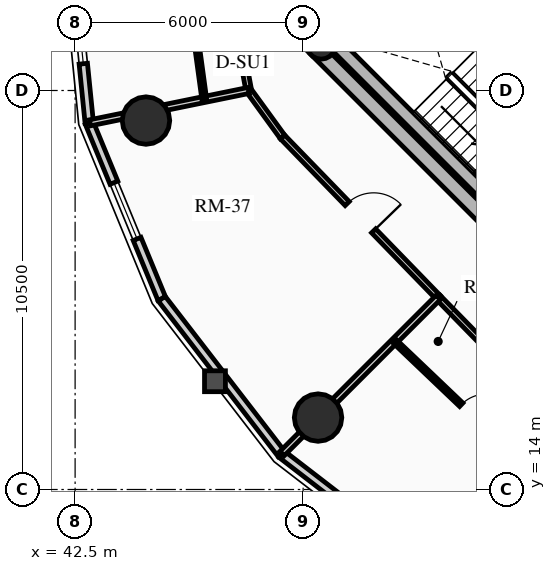
"""IFC4 building model, lengths in metres.
Left out: names, types, materials, properties, quantities, classifications, styles, units other than length and angle.
Written with IfcOpenShell. Run it as: python <this file> out.ifc"""

import sys

from ifc_helpers import new_model, si_unit, direction, frame, frame_2d, origin, origin_2d, place, context, subcontext, project, spatial, rectangle, circle, hollow_circle, extrude, source, transform, mapped, element, fill, save


model = new_model("IFC4")
c1 = context("Model", 3, precision=1e-05, world=origin(), true_north=direction((0.0, 1.0)))
c2 = subcontext(c1, "Body", "Model", "MODEL_VIEW")
j1 = project(units=[si_unit("LENGTHUNIT", "METRE"), si_unit("PLANEANGLEUNIT", "RADIAN")], contexts=[c1])
p1 = place(None, origin())
s1 = spatial("IfcSite", under=j1, at=p1, CompositionType="ELEMENT")
p2 = place(p1, origin())
s2 = spatial("IfcBuilding", under=s1, at=p2, CompositionType="ELEMENT")
p3 = place(p2, frame((0.0, 0.0, 171.97)))
s3 = spatial("IfcBuildingStorey", under=s2, at=p3, CompositionType="ELEMENT", Elevation=171.97)
p4 = place(p3, frame((58.702, 15.732, 0.0), z_axis=(0.0, 0.0, 1.0), x_axis=(-0.707106781187, 0.707106781187, 0.0)))
e1 = element("IfcWall", 1, at=p4, inside=s3, PredefinedType="SHEAR", context=c2, shape_type="SweptSolid", body=[
    extrude(rectangle(XDim=14.1, YDim=0.4, at=frame_2d((7.05, 0.0))), origin(), (0.0, 0.0, 1.0), 2.91),
])
p5 = place(p3, frame((48.873, 25.561, 0.0), z_axis=(0.0, 0.0, 1.0), x_axis=(0.707106781187, 0.707106781187, 0.0)))
e2 = element("IfcWall", 2, at=p5, inside=s3, PredefinedType="SHEAR", context=c2, shape_type="SweptSolid", body=[
    extrude(rectangle(XDim=10.7, YDim=0.4, at=frame_2d((5.35, 0.0))), origin(), (0.0, 0.0, 1.0), 2.91),
])
m1 = source(origin(), c2, "Body", "SweptSolid", [
    extrude(rectangle(XDim=1.5, YDim=2.02, at=frame_2d((0.75, 1.01))), frame((0.0, 0.21, 0.0), z_axis=(0.0, -1.0, 0.0), x_axis=(1.0, 0.0, 0.0)), (0.0, 0.0, 1.0), 0.42),
])
p6 = place(p5, frame((4.6, 0.0, 0.0)))
e3 = element("IfcOpeningElement", 3, at=p6, cuts=e2, PredefinedType="OPENING", context=c2, shape_type="MappedRepresentation", body=[
    mapped(m1, transform((0.0, 0.0, 0.0), x_axis=(1.0, 0.0, 0.0), y_axis=(0.0, 1.0, 0.0), z_axis=(0.0, 0.0, 1.0), scale=1.0)),
])
p7 = place(p3, frame((61.06, 18.373, 0.0), z_axis=(0.0, 0.0, 1.0), x_axis=(-0.707106781187, 0.707106781187, 0.0)))
e4 = element("IfcWall", 4, at=p7, inside=s3, PredefinedType="SHEAR", context=c2, shape_type="SweptSolid", body=[
    extrude(rectangle(XDim=13.7, YDim=0.35, at=frame_2d((6.85, 0.0))), origin(), (0.0, 0.0, 1.0), 2.91),
])
m2 = source(origin(), c2, "Body", "SweptSolid", [
    extrude(rectangle(XDim=1.1, YDim=2.015, at=frame_2d((0.55, 1.007))), frame((0.0, 0.185, 0.0), z_axis=(0.0, -1.0, 0.0), x_axis=(1.0, 0.0, 0.0)), (0.0, 0.0, 1.0), 0.37),
])
p8 = place(p7, frame((4.85, 0.0, 0.0)))
e5 = element("IfcOpeningElement", 5, at=p8, cuts=e4, PredefinedType="OPENING", context=c2, shape_type="MappedRepresentation", body=[
    mapped(m2, transform((0.0, 0.0, 0.0), x_axis=(1.0, 0.0, 0.0), y_axis=(0.0, 1.0, 0.0), z_axis=(0.0, 0.0, 1.0), scale=1.0)),
])
p9 = place(p7, frame((0.625, 0.0, 0.0)))
e6 = element("IfcOpeningElement", 6, at=p9, cuts=e4, PredefinedType="OPENING", context=c2, shape_type="MappedRepresentation", body=[
    mapped(m2, transform((0.0, 0.0, 0.0), x_axis=(1.0, 0.0, 0.0), y_axis=(0.0, 1.0, 0.0), z_axis=(0.0, 0.0, 1.0), scale=1.0)),
])
p10 = place(p7, frame((2.625, 0.0, 0.0)))
e7 = element("IfcOpeningElement", 7, at=p10, cuts=e4, PredefinedType="OPENING", context=c2, shape_type="MappedRepresentation", body=[
    mapped(m2, transform((0.0, 0.0, 0.0), x_axis=(1.0, 0.0, 0.0), y_axis=(0.0, 1.0, 0.0), z_axis=(0.0, 0.0, 1.0), scale=1.0)),
])
m3 = source(origin(), c2, "Body", "SweptSolid", [
    extrude(rectangle(XDim=1.15, YDim=2.02, at=frame_2d((0.575, 1.01))), frame((0.0, 0.185, 0.0), z_axis=(0.0, -1.0, 0.0), x_axis=(1.0, 0.0, 0.0)), (0.0, 0.0, 1.0), 0.37),
])
p11 = place(p7, frame((7.27, 0.0, 0.0)))
e8 = element("IfcOpeningElement", 8, at=p11, cuts=e4, PredefinedType="OPENING", context=c2, shape_type="MappedRepresentation", body=[
    mapped(m3, transform((0.0, 0.0, 0.0), x_axis=(1.0, 0.0, 0.0), y_axis=(0.0, 1.0, 0.0), z_axis=(0.0, 0.0, 1.0), scale=1.0)),
])
p12 = place(p3, frame((53.922, 21.141, 0.0), z_axis=(0.0, 0.0, 1.0), x_axis=(-0.707106781187, 0.707106781187, 0.0)))
e9 = element("IfcWall", 9, at=p12, inside=s3, PredefinedType="SHEAR", context=c2, shape_type="SweptSolid", body=[
    extrude(rectangle(XDim=6.695, YDim=0.35, at=frame_2d((3.348, 0.0))), origin(), (0.0, 0.0, 1.0), 2.91),
])
p13 = place(p3, frame((48.976, 25.706, 0.0), z_axis=(0.0, 0.0, 1.0), x_axis=(0.707106781187, 0.707106781187, 0.0)))
e10 = element("IfcColumn", 10, at=p13, inside=s3, PredefinedType="COLUMN", context=c2, shape_type="SweptSolid", body=[
    extrude(hollow_circle(Radius=0.38, WallThickness=0.032, at=origin_2d()), origin(), (0.0, 0.0, 1.0), 2.91),
])
for number, where, z_axis, x_axis in (
    (11, (44.365, 23.709, 0.0), (0.0, 0.0, 1.0), (1.0, 0.0, 0.0)),
    (12, (48.893, 15.893, 0.0), (0.0, 0.0, 1.0), (1.0, 0.0, 0.0)),
):
    element("IfcColumn", number, at=place(p3, frame(where, z_axis=z_axis, x_axis=x_axis)), inside=s3, PredefinedType="USERDEFINED", context=c2, shape_type="SweptSolid", body=[
        extrude(circle(Radius=0.625, at=origin_2d()), origin(), (0.0, 0.0, 1.0), 2.91),
    ])
p14 = place(p3, frame((42.873, 23.646, 0.0), z_axis=(0.0, 0.0, 1.0), x_axis=(-0.100438356004, 0.994943283129, 0.0)))
e13 = element("IfcWall", 13, at=p14, inside=s3, PredefinedType="SOLIDWALL", context=c2, shape_type="SweptSolid", body=[
    extrude(rectangle(XDim=4.733, YDim=0.22, at=frame_2d((2.366, 0.0))), origin(), (0.0, 0.0, 1.0), 2.245),
])
m4 = source(origin(), c2, "Body", "SweptSolid", [
    extrude(rectangle(XDim=1.6, YDim=1.3, at=frame_2d((0.8, 0.65))), frame((0.0, 0.12, 0.0), z_axis=(0.0, -1.0, 0.0), x_axis=(1.0, 0.0, 0.0)), (0.0, 0.0, 1.0), 0.24),
])
p15 = place(p14, frame((1.566, 0.0, 0.65)))
e14 = element("IfcOpeningElement", 14, at=p15, cuts=e13, PredefinedType="OPENING", context=c2, shape_type="MappedRepresentation", body=[
    mapped(m4, transform((0.0, 0.0, 0.0), x_axis=(1.0, 0.0, 0.0), y_axis=(0.0, 1.0, 0.0), z_axis=(0.0, 0.0, 1.0), scale=1.0)),
])
p16 = place(p3, frame((44.78, 19.021, 0.0), z_axis=(0.0, 0.0, 1.0), x_axis=(-0.381196434348, 0.924494066201, 0.0)))
e15 = element("IfcWall", 15, at=p16, inside=s3, PredefinedType="SOLIDWALL", context=c2, shape_type="SweptSolid", body=[
    extrude(rectangle(XDim=5.003, YDim=0.22, at=frame_2d((2.501, 0.0))), origin(), (0.0, 0.0, 1.0), 2.245),
])
p17 = place(p16, frame((1.702, 0.0, 0.65)))
e16 = element("IfcOpeningElement", 16, at=p17, cuts=e15, PredefinedType="OPENING", context=c2, shape_type="MappedRepresentation", body=[
    mapped(m4, transform((0.0, 0.0, 0.0), x_axis=(1.0, 0.0, 0.0), y_axis=(0.0, 1.0, 0.0), z_axis=(0.0, 0.0, 1.0), scale=1.0)),
])
p18 = place(p3, frame((47.932, 14.932, 0.0), z_axis=(0.0, 0.0, 1.0), x_axis=(-0.610569654715, 0.791962560189, 0.0)))
e17 = element("IfcWall", 17, at=p18, inside=s3, PredefinedType="SOLIDWALL", context=c2, shape_type="SweptSolid", body=[
    extrude(rectangle(XDim=5.163, YDim=0.22, at=frame_2d((2.582, 0.0))), origin(), (0.0, 0.0, 1.0), 2.245),
])
p19 = place(p3, frame((52.021, 11.78, 0.0), z_axis=(0.0, 0.0, 1.0), x_axis=(-0.791962560189, 0.610569654715, 0.0)))
e18 = element("IfcWall", 18, at=p19, inside=s3, PredefinedType="SOLIDWALL", context=c2, shape_type="SweptSolid", body=[
    extrude(rectangle(XDim=5.163, YDim=0.22, at=frame_2d((2.582, 0.0))), origin(), (0.0, 0.0, 1.0), 2.245),
])
p20 = place(p19, frame((1.782, 0.0, 0.65)))
e19 = element("IfcOpeningElement", 19, at=p20, cuts=e18, PredefinedType="OPENING", context=c2, shape_type="MappedRepresentation", body=[
    mapped(m4, transform((0.0, 0.0, 0.0), x_axis=(1.0, 0.0, 0.0), y_axis=(0.0, 1.0, 0.0), z_axis=(0.0, 0.0, 1.0), scale=1.0)),
])
p21 = place(p3, frame((46.822, 25.836, 0.0), z_axis=(0.0, 0.0, 1.0), x_axis=(0.182115036249, -0.983277231289, 0.0)))
e20 = element("IfcWall", 20, at=p21, inside=s3, PredefinedType="PARTITIONING", context=c2, shape_type="SweptSolid", body=[
    extrude(rectangle(XDim=1.357, YDim=0.15, at=frame_2d((0.678, 0.0))), origin(), (0.0, 0.0, 1.0), 2.245),
])
p22 = place(p3, frame((47.069, 24.502, 0.0), z_axis=(0.0, 0.0, 1.0), x_axis=(0.587577436866, -0.809167940347, 0.0)))
e21 = element("IfcWall", 21, at=p22, inside=s3, PredefinedType="PARTITIONING", context=c2, shape_type="SweptSolid", body=[
    extrude(rectangle(XDim=1.515, YDim=0.15, at=frame_2d((0.757, 0.0))), origin(), (0.0, 0.0, 1.0), 2.245),
])
p23 = place(p3, frame((47.959, 23.277, 0.0), z_axis=(0.0, 0.0, 1.0), x_axis=(0.696422573496, -0.717631938479, 0.0)))
e22 = element("IfcWall", 22, at=p23, inside=s3, PredefinedType="PARTITIONING", context=c2, shape_type="SweptSolid", body=[
    extrude(rectangle(XDim=5.882, YDim=0.15, at=frame_2d((2.941, 0.0))), origin(), (0.0, 0.0, 1.0), 2.675),
])
m5 = source(origin(), c2, "Body", "SweptSolid", [
    extrude(rectangle(XDim=1.0, YDim=2.015, at=frame_2d((0.5, 1.007))), frame((0.0, 0.085, 0.0), z_axis=(0.0, -1.0, 0.0), x_axis=(1.0, 0.0, 0.0)), (0.0, 0.0, 1.0), 0.17),
])
p24 = place(p23, frame((2.441, 0.0, 0.0)))
e23 = element("IfcOpeningElement", 23, at=p24, cuts=e22, PredefinedType="OPENING", context=c2, shape_type="MappedRepresentation", body=[
    mapped(m5, transform((0.0, 0.0, 0.0), x_axis=(1.0, 0.0, 0.0), y_axis=(0.0, 1.0, 0.0), z_axis=(0.0, 0.0, 1.0), scale=1.0)),
])
p25 = place(p3, frame((52.055, 19.055, 0.0), z_axis=(0.0, 0.0, 1.0), x_axis=(0.699249850691, -0.714877364524, 0.0)))
e24 = element("IfcWall", 24, at=p25, inside=s3, PredefinedType="PARTITIONING", context=c2, shape_type="SweptSolid", body=[
    extrude(rectangle(XDim=5.999, YDim=0.15, at=frame_2d((3.0, 0.0))), origin(), (0.0, 0.0, 1.0), 2.245),
])
p26 = place(p3, frame((47.069, 24.502, 0.0), z_axis=(0.0, 0.0, 1.0), x_axis=(-0.979772902724, -0.200112616012, 0.0)))
e25 = element("IfcWall", 25, at=p26, inside=s3, PredefinedType="PARTITIONING", context=c2, shape_type="SweptSolid", body=[
    extrude(rectangle(XDim=4.263, YDim=0.16, at=frame_2d((2.131, 0.0))), origin(), (0.0, 0.0, 1.0), 2.245),
])
p27 = place(p3, frame((52.055, 19.055, 0.0), z_axis=(0.0, 0.0, 1.0), x_axis=(-0.707106781187, -0.707106781187, 0.0)))
e26 = element("IfcWall", 26, at=p27, inside=s3, PredefinedType="PARTITIONING", context=c2, shape_type="SweptSolid", body=[
    extrude(rectangle(XDim=5.811, YDim=0.16, at=frame_2d((2.906, 0.0))), origin(), (0.0, 0.0, 1.0), 2.245),
])
p28 = place(p3, frame((45.588, 26.541, 0.0), z_axis=(0.0, 0.0, 1.0), x_axis=(0.135321759641, -0.990801706381, 0.0)))
e27 = element("IfcWall", 27, at=p28, inside=s3, PredefinedType="PARTITIONING", context=c2, shape_type="SweptSolid", body=[
    extrude(rectangle(XDim=2.299, YDim=0.125, at=frame_2d((1.149, 0.0))), origin(), (0.0, 0.0, 1.0), 2.245),
])
p29 = place(p3, frame((50.905, 17.905, 0.0), z_axis=(0.0, 0.0, 1.0), x_axis=(0.723816902075, -0.689992095803, 0.0)))
e28 = element("IfcWall", 28, at=p29, inside=s3, PredefinedType="PARTITIONING", context=c2, shape_type="SweptSolid", body=[
    extrude(rectangle(XDim=5.753, YDim=0.125, at=frame_2d((2.876, 0.0))), origin(), (0.0, 0.0, 1.0), 2.245),
])
m6 = source(origin(), c2, "Body", "SweptSolid", [
    extrude(rectangle(XDim=0.9, YDim=2.005, at=frame_2d((0.45, 1.002))), frame((0.0, 0.073, 0.0), z_axis=(0.0, -1.0, 0.0), x_axis=(1.0, 0.0, 0.0)), (0.0, 0.0, 1.0), 0.145),
])
p30 = place(p29, frame((2.426, 0.0, 0.0)))
e29 = element("IfcOpeningElement", 29, at=p30, cuts=e28, PredefinedType="OPENING", context=c2, shape_type="MappedRepresentation", body=[
    mapped(m6, transform((0.0, 0.0, 0.0), x_axis=(1.0, 0.0, 0.0), y_axis=(0.0, 1.0, 0.0), z_axis=(0.0, 0.0, 1.0), scale=1.0)),
])
m7 = source(origin(), c2, "Body", "SweptSolid", [
    extrude(rectangle(XDim=1.6, YDim=1.3, at=frame_2d((0.8, 0.65))), frame((0.0, 0.03, 0.0), z_axis=(0.0, -1.0, 0.0), x_axis=(1.0, 0.0, 0.0)), (0.0, 0.0, 1.0), 0.06),
])
p31 = place(p15, origin())
e30 = element("IfcWindow", 30, at=p31, inside=s3, PartitioningType="SINGLE_PANEL", PredefinedType="WINDOW", context=c2, shape_type="MappedRepresentation", body=[
    mapped(m7, transform((0.0, 0.0, 0.0), x_axis=(1.0, 0.0, 0.0), y_axis=(0.0, 1.0, 0.0), z_axis=(0.0, 0.0, 1.0), scale=1.0)),
])
fill(e14, e30)
p32 = place(p17, origin())
e31 = element("IfcWindow", 31, at=p32, inside=s3, PartitioningType="SINGLE_PANEL", PredefinedType="WINDOW", context=c2, shape_type="MappedRepresentation", body=[
    mapped(m7, transform((0.0, 0.0, 0.0), x_axis=(1.0, 0.0, 0.0), y_axis=(0.0, 1.0, 0.0), z_axis=(0.0, 0.0, 1.0), scale=1.0)),
])
fill(e16, e31)
m8 = source(origin(), c2, "Body", "SweptSolid", [
    extrude(rectangle(XDim=1.0, YDim=2.015, at=frame_2d((0.5, 1.007))), frame((0.0, 0.025, 0.0), z_axis=(0.0, -1.0, 0.0), x_axis=(1.0, 0.0, 0.0)), (0.0, 0.0, 1.0), 0.05),
])
p33 = place(p24, origin())
e32 = element("IfcDoor", 32, at=p33, inside=s3, OperationType="SINGLE_SWING_RIGHT", PredefinedType="DOOR", context=c2, shape_type="MappedRepresentation", body=[
    mapped(m8, transform((0.0, 0.0, 0.0), x_axis=(1.0, 0.0, 0.0), y_axis=(0.0, 1.0, 0.0), z_axis=(0.0, 0.0, 1.0), scale=1.0)),
])
fill(e23, e32)
m9 = source(origin(), c2, "Body", "SweptSolid", [
    extrude(rectangle(XDim=0.9, YDim=2.005, at=frame_2d((0.45, 1.002))), frame((0.0, 0.025, 0.0), z_axis=(0.0, -1.0, 0.0), x_axis=(1.0, 0.0, 0.0)), (0.0, 0.0, 1.0), 0.05),
])
p34 = place(p30, origin())
e33 = element("IfcDoor", 33, at=p34, inside=s3, OperationType="SINGLE_SWING_RIGHT", PredefinedType="DOOR", context=c2, shape_type="MappedRepresentation", body=[
    mapped(m9, transform((0.0, 0.0, 0.0), x_axis=(1.0, 0.0, 0.0), y_axis=(0.0, 1.0, 0.0), z_axis=(0.0, 0.0, 1.0), scale=1.0)),
])
fill(e29, e33)
save(model, sys.argv[1])
